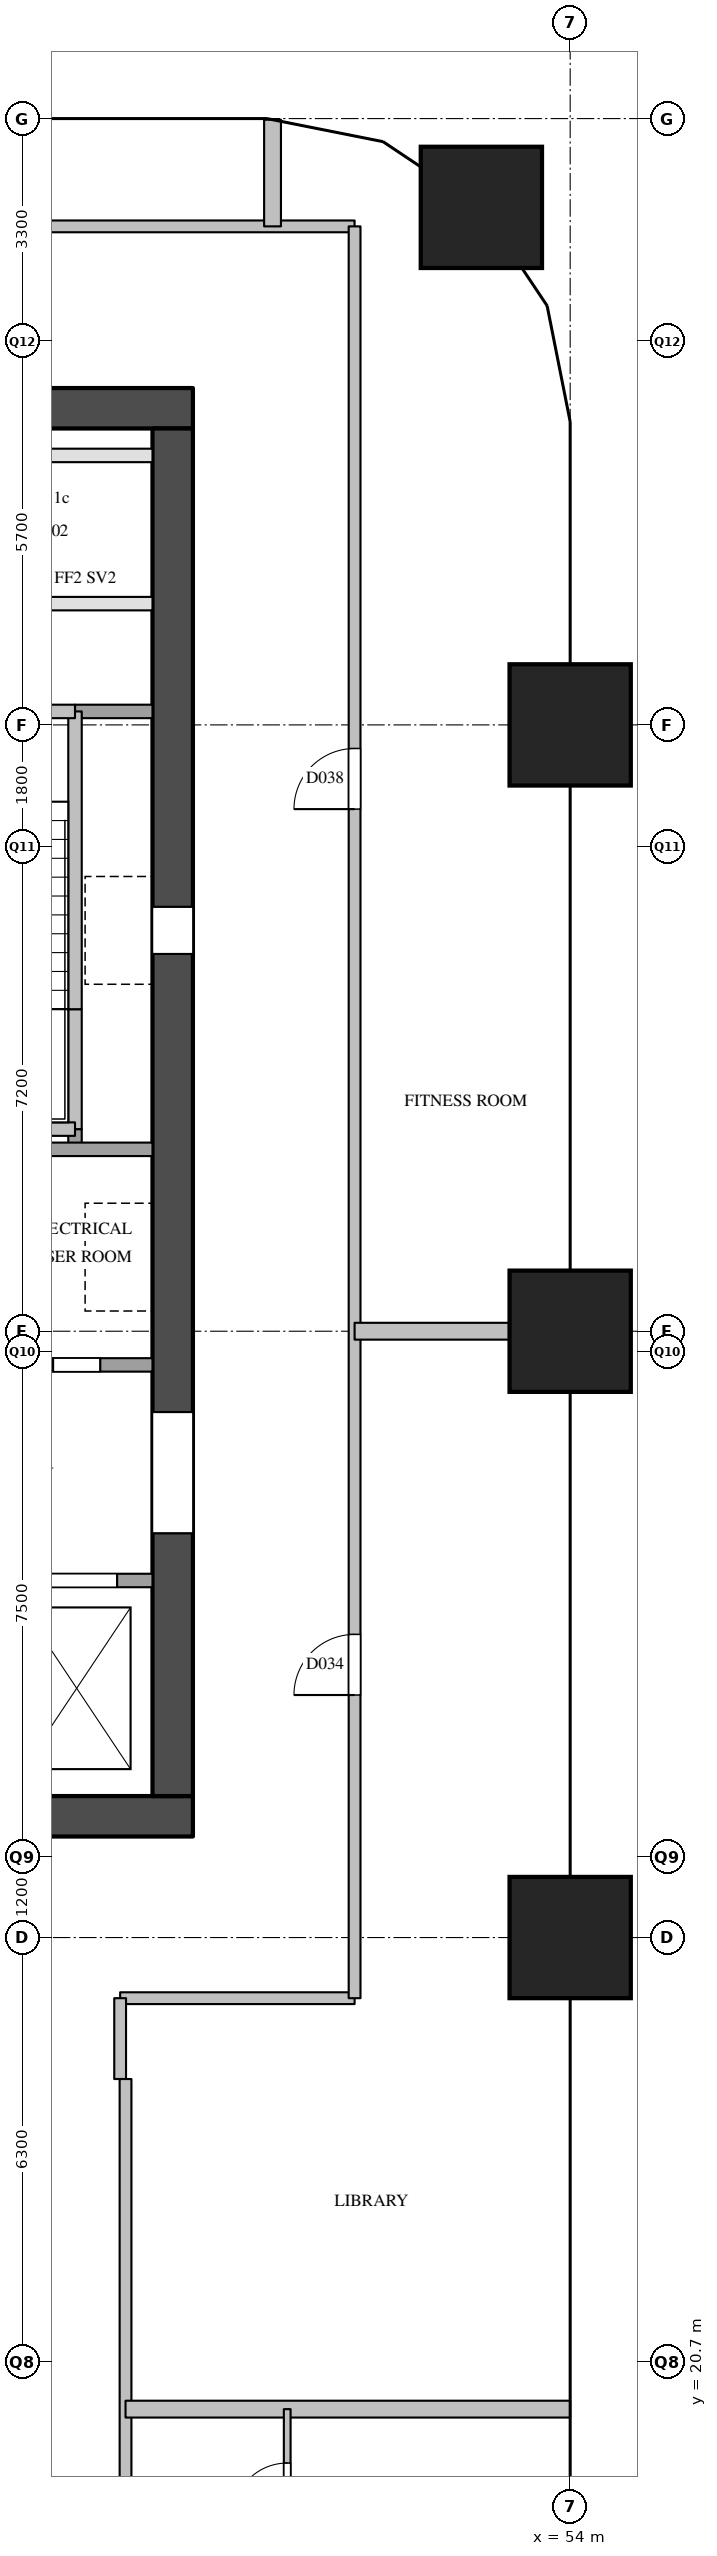
"""IFC4 building model, lengths in metres.
Left out: names, types, materials, properties, quantities, classifications, styles, units other than length and angle.
Written with IfcOpenShell. Run it as: python <this file> out.ifc"""

import sys

from ifc_helpers import new_model, si_unit, direction, frame, frame_2d, origin, origin_2d, place, context, subcontext, project, spatial, rectangle, extrude, element, fill, save


model = new_model("IFC4")
c1 = context("Model", 3, precision=1e-05, world=origin(), true_north=direction((0.0, 1.0)))
c2 = subcontext(c1, "Body", "Model", "MODEL_VIEW")
j1 = project(units=[si_unit("LENGTHUNIT", "METRE"), si_unit("PLANEANGLEUNIT", "RADIAN")], contexts=[c1])
p1 = place(None, origin())
s1 = spatial("IfcSite", under=j1, at=p1, CompositionType="ELEMENT")
p2 = place(p1, origin())
s2 = spatial("IfcBuilding", under=s1, at=p2, CompositionType="ELEMENT")
p3 = place(p2, frame((0.0, 0.0, 38.6)))
s3 = spatial("IfcBuildingStorey", under=s2, at=p3, CompositionType="ELEMENT", Elevation=38.6)
for number, where, z_axis, x_axis in (
    (1, (54.0, 27.0, 0.0), (0.0, 0.0, 1.0), (1.0, 0.0, 0.0)),
    (2, (54.0, 36.0, 0.0), (0.0, 0.0, 1.0), (1.0, 0.0, 0.0)),
    (3, (54.0, 45.0, 0.0), (0.0, 0.0, 1.0), (1.0, 0.0, 0.0)),
    (4, (52.682, 52.682, 0.0), (0.0, 0.0, 1.0), (1.0, 0.0, 0.0)),
):
    element("IfcColumn", number, at=place(p3, frame(where, z_axis=z_axis, x_axis=x_axis)), inside=s3, PredefinedType="COLUMN", context=c2, shape_type="SweptSolid", body=[
        extrude(rectangle(XDim=1.8, YDim=1.8, at=origin_2d()), origin(), (0.0, 0.0, 1.0), 3.8),
    ])
for number, where, z_axis, x_axis in (
    (5, (36.0, 28.8, 0.0), (0.0, 0.0, 1.0), (1.0, 0.0, 0.0)),
    (6, (36.0, 49.7, 0.0), (0.0, 0.0, 1.0), (1.0, 0.0, 0.0)),
):
    element("IfcWall", number, at=place(p3, frame(where, z_axis=z_axis, x_axis=x_axis)), inside=s3, PredefinedType="SHEAR", context=c2, shape_type="SweptSolid", body=[
        extrude(rectangle(XDim=12.4, YDim=0.6, at=frame_2d((6.2, 0.0))), origin(), (0.0, 0.0, 1.0), 3.5),
    ])
p4 = place(p3, frame((48.1, 29.1, 0.0), z_axis=(0.0, 0.0, 1.0), x_axis=(0.0, 1.0, 0.0)))
e7 = element("IfcWall", 7, at=p4, inside=s3, PredefinedType="SHEAR", context=c2, shape_type="SweptSolid", body=[
    extrude(rectangle(XDim=20.3, YDim=0.6, at=frame_2d((10.15, 0.0))), origin(), (0.0, 0.0, 1.0), 3.5),
])
p5 = place(p4, frame((12.5, 0.0, 0.0)))
e8 = element("IfcOpeningElement", 8, at=p5, cuts=e7, PredefinedType="OPENING", context=c2, shape_type="SweptSolid", body=[
    extrude(rectangle(XDim=0.7, YDim=2.1, at=frame_2d((0.35, 1.05))), frame((0.0, 0.31, 0.0), z_axis=(0.0, -1.0, 0.0), x_axis=(1.0, 0.0, 0.0)), (0.0, 0.0, 1.0), 0.62),
])
p6 = place(p4, frame((3.9, 0.0, 0.0)))
e9 = element("IfcOpeningElement", 9, at=p6, cuts=e7, PredefinedType="OPENING", context=c2, shape_type="SweptSolid", body=[
    extrude(rectangle(XDim=1.8, YDim=2.1, at=frame_2d((0.9, 1.05))), frame((0.0, 0.31, 0.0), z_axis=(0.0, -1.0, 0.0), x_axis=(1.0, 0.0, 0.0)), (0.0, 0.0, 1.0), 0.62),
])
p7 = place(p3, frame((46.65, 38.7, 0.0), z_axis=(0.0, 0.0, 1.0), x_axis=(0.0, 1.0, 0.0)))
e10 = element("IfcWall", 10, at=p7, inside=s3, PredefinedType="SOLIDWALL", context=c2, shape_type="SweptSolid", body=[
    extrude(rectangle(XDim=0.3, YDim=0.2, at=frame_2d((0.15, 0.0))), origin(), (0.0, 0.0, 1.0), 3.5),
])
p8 = place(p3, frame((46.65, 39.0, 0.0), z_axis=(0.0, 0.0, 1.0), x_axis=(0.0, 1.0, 0.0)))
e11 = element("IfcWall", 11, at=p8, inside=s3, PredefinedType="SOLIDWALL", context=c2, shape_type="SweptSolid", body=[
    extrude(rectangle(XDim=1.78, YDim=0.2, at=frame_2d((0.89, 0.0))), origin(), (0.0, 0.0, 1.0), 3.5),
])
p9 = place(p3, frame((46.65, 40.78, 0.0), z_axis=(0.0, 0.0, 1.0), x_axis=(0.0, 1.0, 0.0)))
e12 = element("IfcWall", 12, at=p9, inside=s3, PredefinedType="SOLIDWALL", context=c2, shape_type="SweptSolid", body=[
    extrude(rectangle(XDim=4.42, YDim=0.2, at=frame_2d((2.21, 0.0))), origin(), (0.0, 0.0, 1.0), 3.5),
])
p10 = place(p3, frame((36.6, 32.3, 0.0), z_axis=(0.0, 0.0, 1.0), x_axis=(1.0, 0.0, 0.0)))
e13 = element("IfcWall", 13, at=p10, inside=s3, PredefinedType="SOLIDWALL", context=c2, shape_type="SweptSolid", body=[
    extrude(rectangle(XDim=11.2, YDim=0.2, at=frame_2d((5.6, 0.0))), origin(), (0.0, 0.0, 1.0), 3.5),
])
p11 = place(p10, frame((7.225, 0.0, 0.0)))
e14 = element("IfcOpeningElement", 14, at=p11, cuts=e13, PredefinedType="OPENING", context=c2, shape_type="SweptSolid", body=[
    extrude(rectangle(XDim=1.2, YDim=2.1, at=frame_2d((0.6, 1.05))), frame((0.0, 0.11, 0.0), z_axis=(0.0, -1.0, 0.0), x_axis=(1.0, 0.0, 0.0)), (0.0, 0.0, 1.0), 0.22),
])
p12 = place(p10, frame((9.475, 0.0, 0.0)))
e15 = element("IfcOpeningElement", 15, at=p12, cuts=e13, PredefinedType="OPENING", context=c2, shape_type="SweptSolid", body=[
    extrude(rectangle(XDim=1.2, YDim=2.1, at=frame_2d((0.6, 1.05))), frame((0.0, 0.11, 0.0), z_axis=(0.0, -1.0, 0.0), x_axis=(1.0, 0.0, 0.0)), (0.0, 0.0, 1.0), 0.22),
])
p13 = place(p3, frame((43.3, 35.5, 0.0), z_axis=(0.0, 0.0, 1.0), x_axis=(1.0, 0.0, 0.0)))
e16 = element("IfcWall", 16, at=p13, inside=s3, PredefinedType="SOLIDWALL", context=c2, shape_type="SweptSolid", body=[
    extrude(rectangle(XDim=4.5, YDim=0.2, at=frame_2d((2.25, 0.0))), origin(), (0.0, 0.0, 1.0), 3.5),
])
p14 = place(p13, frame((0.525, 0.0, 0.0)))
e17 = element("IfcOpeningElement", 17, at=p14, cuts=e16, PredefinedType="OPENING", context=c2, shape_type="SweptSolid", body=[
    extrude(rectangle(XDim=1.2, YDim=2.1, at=frame_2d((0.6, 1.05))), frame((0.0, 0.11, 0.0), z_axis=(0.0, -1.0, 0.0), x_axis=(1.0, 0.0, 0.0)), (0.0, 0.0, 1.0), 0.22),
])
p15 = place(p13, frame((3.025, 0.0, 0.0)))
e18 = element("IfcOpeningElement", 18, at=p15, cuts=e16, PredefinedType="OPENING", context=c2, shape_type="SweptSolid", body=[
    extrude(rectangle(XDim=0.7, YDim=2.1, at=frame_2d((0.35, 1.05))), frame((0.0, 0.11, 0.0), z_axis=(0.0, -1.0, 0.0), x_axis=(1.0, 0.0, 0.0)), (0.0, 0.0, 1.0), 0.22),
])
p16 = place(p3, frame((43.3, 38.7, 0.0), z_axis=(0.0, 0.0, 1.0), x_axis=(1.0, 0.0, 0.0)))
e19 = element("IfcWall", 19, at=p16, inside=s3, PredefinedType="SOLIDWALL", context=c2, shape_type="SweptSolid", body=[
    extrude(rectangle(XDim=4.5, YDim=0.2, at=frame_2d((2.25, 0.0))), origin(), (0.0, 0.0, 1.0), 3.5),
])
p17 = place(p3, frame((43.4, 39.0, 0.0), z_axis=(0.0, 0.0, 1.0), x_axis=(1.0, 0.0, 0.0)))
e20 = element("IfcWall", 20, at=p17, inside=s3, PredefinedType="SOLIDWALL", context=c2, shape_type="SweptSolid", body=[
    extrude(rectangle(XDim=3.25, YDim=0.2, at=frame_2d((1.625, 0.0))), origin(), (0.0, 0.0, 1.0), 3.5),
])
p18 = place(p3, frame((46.65, 45.2, 0.0), z_axis=(0.0, 0.0, 1.0), x_axis=(1.0, 0.0, 0.0)))
e21 = element("IfcWall", 21, at=p18, inside=s3, PredefinedType="SOLIDWALL", context=c2, shape_type="SweptSolid", body=[
    extrude(rectangle(XDim=1.15, YDim=0.2, at=frame_2d((0.575, 0.0))), origin(), (0.0, 0.0, 1.0), 3.5),
])
p19 = place(p3, frame((36.6, 45.2, 0.0), z_axis=(0.0, 0.0, 1.0), x_axis=(1.0, 0.0, 0.0)))
e22 = element("IfcWall", 22, at=p19, inside=s3, PredefinedType="SOLIDWALL", context=c2, shape_type="SweptSolid", body=[
    extrude(rectangle(XDim=10.05, YDim=0.2, at=frame_2d((5.025, 0.0))), origin(), (0.0, 0.0, 1.0), 3.5),
])
p20 = place(p19, frame((1.125, 0.0, 0.0)))
e23 = element("IfcOpeningElement", 23, at=p20, cuts=e22, PredefinedType="OPENING", context=c2, shape_type="SweptSolid", body=[
    extrude(rectangle(XDim=1.1, YDim=2.1, at=frame_2d((0.55, 1.05))), frame((0.0, 0.11, 0.0), z_axis=(0.0, -1.0, 0.0), x_axis=(1.0, 0.0, 0.0)), (0.0, 0.0, 1.0), 0.22),
])
p21 = place(p19, frame((4.475, 0.0, 0.0)))
e24 = element("IfcOpeningElement", 24, at=p21, cuts=e22, PredefinedType="OPENING", context=c2, shape_type="SweptSolid", body=[
    extrude(rectangle(XDim=1.1, YDim=2.1, at=frame_2d((0.55, 1.05))), frame((0.0, 0.11, 0.0), z_axis=(0.0, -1.0, 0.0), x_axis=(1.0, 0.0, 0.0)), (0.0, 0.0, 1.0), 0.22),
])
p22 = place(p19, frame((7.825, 0.0, 0.0)))
e25 = element("IfcOpeningElement", 25, at=p22, cuts=e22, PredefinedType="OPENING", context=c2, shape_type="SweptSolid", body=[
    extrude(rectangle(XDim=1.1, YDim=2.1, at=frame_2d((0.55, 1.05))), frame((0.0, 0.11, 0.0), z_axis=(0.0, -1.0, 0.0), x_axis=(1.0, 0.0, 0.0)), (0.0, 0.0, 1.0), 0.22),
])
p23 = place(p3, frame((36.6, 46.8, 0.0), z_axis=(0.0, 0.0, 1.0), x_axis=(1.0, 0.0, 0.0)))
e26 = element("IfcWall", 26, at=p23, inside=s3, PredefinedType="PARTITIONING", context=c2, shape_type="SweptSolid", body=[
    extrude(rectangle(XDim=11.2, YDim=0.2, at=frame_2d((5.6, 0.0))), origin(), (0.0, 0.0, 1.0), 3.5),
])
p24 = place(p23, frame((1.23, 0.0, 0.0)))
e27 = element("IfcOpeningElement", 27, at=p24, cuts=e26, PredefinedType="OPENING", context=c2, shape_type="SweptSolid", body=[
    extrude(rectangle(XDim=0.9, YDim=2.1, at=frame_2d((0.45, 1.05))), frame((0.0, 0.11, 0.0), z_axis=(0.0, -1.0, 0.0), x_axis=(1.0, 0.0, 0.0)), (0.0, 0.0, 1.0), 0.22),
])
p25 = place(p23, frame((6.83, 0.0, 0.0)))
e28 = element("IfcOpeningElement", 28, at=p25, cuts=e26, PredefinedType="OPENING", context=c2, shape_type="SweptSolid", body=[
    extrude(rectangle(XDim=0.9, YDim=2.1, at=frame_2d((0.45, 1.05))), frame((0.0, 0.11, 0.0), z_axis=(0.0, -1.0, 0.0), x_axis=(1.0, 0.0, 0.0)), (0.0, 0.0, 1.0), 0.22),
])
p26 = place(p3, frame((36.6, 49.0, 0.0), z_axis=(0.0, 0.0, 1.0), x_axis=(1.0, 0.0, 0.0)))
e29 = element("IfcWall", 29, at=p26, inside=s3, PredefinedType="PARTITIONING", context=c2, shape_type="SweptSolid", body=[
    extrude(rectangle(XDim=11.2, YDim=0.2, at=frame_2d((5.6, 0.0))), origin(), (0.0, 0.0, 1.0), 3.5),
])
p27 = place(p3, frame((47.32, 24.9, 0.0), z_axis=(0.0, 0.0, 1.0), x_axis=(1.0, 0.0, 0.0)))
e30 = element("IfcWall", 30, at=p27, inside=s3, PredefinedType="PARTITIONING", context=c2, shape_type="SweptSolid", body=[
    extrude(rectangle(XDim=0.08, YDim=0.175, at=frame_2d((0.04, 0.0))), origin(), (0.0, 0.0, 1.0), 3.5),
])
p28 = place(p3, frame((47.32, 26.1, 0.0), z_axis=(0.0, 0.0, 1.0), x_axis=(1.0, 0.0, 0.0)))
e31 = element("IfcWall", 31, at=p28, inside=s3, PredefinedType="PARTITIONING", context=c2, shape_type="SweptSolid", body=[
    extrude(rectangle(XDim=3.48, YDim=0.175, at=frame_2d((1.74, 0.0))), origin(), (0.0, 0.0, 1.0), 3.5),
])
p29 = place(p3, frame((33.6, 52.4, 0.0), z_axis=(0.0, 0.0, 1.0), x_axis=(1.0, 0.0, 0.0)))
e32 = element("IfcWall", 32, at=p29, inside=s3, PredefinedType="PARTITIONING", context=c2, shape_type="SweptSolid", body=[
    extrude(rectangle(XDim=17.2, YDim=0.175, at=frame_2d((8.6, 0.0))), origin(), (0.0, 0.0, 1.0), 3.5),
])
p30 = place(p29, frame((8.691, 0.0, 0.0)))
e33 = element("IfcOpeningElement", 33, at=p30, cuts=e32, PredefinedType="OPENING", context=c2, shape_type="SweptSolid", body=[
    extrude(rectangle(XDim=1.0, YDim=2.1, at=frame_2d((0.5, 1.05))), frame((0.0, 0.097, 0.0), z_axis=(0.0, -1.0, 0.0), x_axis=(1.0, 0.0, 0.0)), (0.0, 0.0, 1.0), 0.195),
])
p31 = place(p3, frame((47.32, 24.9, 0.0), z_axis=(0.0, 0.0, 1.0), x_axis=(0.0, 1.0, 0.0)))
e34 = element("IfcWall", 34, at=p31, inside=s3, PredefinedType="PARTITIONING", context=c2, shape_type="SweptSolid", body=[
    extrude(rectangle(XDim=1.2, YDim=0.175, at=frame_2d((0.6, 0.0))), origin(), (0.0, 0.0, 1.0), 3.5),
])
p32 = place(p3, frame((47.4, 6.6, 0.0), z_axis=(0.0, 0.0, 1.0), x_axis=(0.0, 1.0, 0.0)))
e35 = element("IfcWall", 35, at=p32, inside=s3, PredefinedType="PARTITIONING", context=c2, shape_type="SweptSolid", body=[
    extrude(rectangle(XDim=18.3, YDim=0.175, at=frame_2d((9.15, 0.0))), origin(), (0.0, 0.0, 1.0), 3.5),
])
p33 = place(p32, frame((1.7, 0.0, 0.0)))
e36 = element("IfcOpeningElement", 36, at=p33, cuts=e35, PredefinedType="OPENING", context=c2, shape_type="SweptSolid", body=[
    extrude(rectangle(XDim=1.0, YDim=2.1, at=frame_2d((0.5, 1.05))), frame((0.0, 0.097, 0.0), z_axis=(0.0, -1.0, 0.0), x_axis=(1.0, 0.0, 0.0)), (0.0, 0.0, 1.0), 0.195),
])
p34 = place(p32, frame((7.7, 0.0, 0.0)))
e37 = element("IfcOpeningElement", 37, at=p34, cuts=e35, PredefinedType="OPENING", context=c2, shape_type="SweptSolid", body=[
    extrude(rectangle(XDim=1.0, YDim=2.1, at=frame_2d((0.5, 1.05))), frame((0.0, 0.097, 0.0), z_axis=(0.0, -1.0, 0.0), x_axis=(1.0, 0.0, 0.0)), (0.0, 0.0, 1.0), 0.195),
])
p35 = place(p3, frame((50.8, 26.1, 0.0), z_axis=(0.0, 0.0, 1.0), x_axis=(0.0, 1.0, 0.0)))
e38 = element("IfcWall", 38, at=p35, inside=s3, PredefinedType="PARTITIONING", context=c2, shape_type="SweptSolid", body=[
    extrude(rectangle(XDim=26.3, YDim=0.175, at=frame_2d((13.15, 0.0))), origin(), (0.0, 0.0, 1.0), 2.5),
])
p36 = place(p35, frame((4.5, 0.0, 0.0)))
e39 = element("IfcOpeningElement", 39, at=p36, cuts=e38, PredefinedType="OPENING", context=c2, shape_type="SweptSolid", body=[
    extrude(rectangle(XDim=0.9, YDim=2.1, at=frame_2d((0.45, 1.05))), frame((0.0, 0.097, 0.0), z_axis=(0.0, -1.0, 0.0), x_axis=(1.0, 0.0, 0.0)), (0.0, 0.0, 1.0), 0.195),
])
p37 = place(p35, frame((17.65, 0.0, 0.0)))
e40 = element("IfcOpeningElement", 40, at=p37, cuts=e38, PredefinedType="OPENING", context=c2, shape_type="SweptSolid", body=[
    extrude(rectangle(XDim=0.9, YDim=2.1, at=frame_2d((0.45, 1.05))), frame((0.0, 0.097, 0.0), z_axis=(0.0, -1.0, 0.0), x_axis=(1.0, 0.0, 0.0)), (0.0, 0.0, 1.0), 0.195),
])
p38 = place(p3, frame((47.4, 20.0, 0.0), z_axis=(0.0, 0.0, 1.0), x_axis=(1.0, 0.0, 0.0)))
e41 = element("IfcWall", 41, at=p38, inside=s3, PredefinedType="PARTITIONING", context=c2, shape_type="SweptSolid", body=[
    extrude(rectangle(XDim=6.6, YDim=0.25, at=frame_2d((3.3, 0.0))), origin(), (0.0, 0.0, 1.0), 2.5),
])
p39 = place(p3, frame((50.8, 36.0, 0.0), z_axis=(0.0, 0.0, 1.0), x_axis=(1.0, 0.0, 0.0)))
e42 = element("IfcWall", 42, at=p39, inside=s3, PredefinedType="PARTITIONING", context=c2, shape_type="SweptSolid", body=[
    extrude(rectangle(XDim=3.2, YDim=0.25, at=frame_2d((1.6, 0.0))), origin(), (0.0, 0.0, 1.0), 3.5),
])
p40 = place(p3, frame((49.582, 52.4, 0.0), z_axis=(0.0, 0.0, 1.0), x_axis=(0.0, 1.0, 0.0)))
e43 = element("IfcWall", 43, at=p40, inside=s3, PredefinedType="PARTITIONING", context=c2, shape_type="SweptSolid", body=[
    extrude(rectangle(XDim=1.584, YDim=0.25, at=frame_2d((0.792, 0.0))), origin(), (0.0, 0.0, 1.0), 2.5),
])
p41 = place(p3, frame((49.8, 17.6, 0.0), z_axis=(0.0, 0.0, 1.0), x_axis=(0.0, 1.0, 0.0)))
e44 = element("IfcWall", 44, at=p41, inside=s3, PredefinedType="PARTITIONING", context=c2, shape_type="SweptSolid", body=[
    extrude(rectangle(XDim=2.4, YDim=0.1, at=frame_2d((1.2, 0.0))), origin(), (0.0, 0.0, 1.0), 3.5),
])
p42 = place(p41, frame((0.8, 0.0, 0.0)))
e45 = element("IfcOpeningElement", 45, at=p42, cuts=e44, PredefinedType="OPENING", context=c2, shape_type="SweptSolid", body=[
    extrude(rectangle(XDim=0.8, YDim=2.1, at=frame_2d((0.4, 1.05))), frame((0.0, 0.06, 0.0), z_axis=(0.0, -1.0, 0.0), x_axis=(1.0, 0.0, 0.0)), (0.0, 0.0, 1.0), 0.12),
])
p43 = place(p12, origin())
e46 = element("IfcDoor", 46, at=p43, inside=s3, OperationType="SLIDING_TO_LEFT", PredefinedType="DOOR", context=c2, shape_type="SweptSolid", body=[
    extrude(rectangle(XDim=1.2, YDim=2.1, at=frame_2d((0.6, 1.05))), frame((0.0, 0.025, 0.0), z_axis=(0.0, -1.0, 0.0), x_axis=(1.0, 0.0, 0.0)), (0.0, 0.0, 1.0), 0.05),
])
fill(e15, e46)
p44 = place(p5, origin())
e47 = element("IfcDoor", 47, at=p44, inside=s3, OperationType="SINGLE_SWING_RIGHT", PredefinedType="DOOR", context=c2, shape_type="SweptSolid", body=[
    extrude(rectangle(XDim=0.7, YDim=2.1, at=frame_2d((0.35, 1.05))), frame((0.0, 0.025, 0.0), z_axis=(0.0, -1.0, 0.0), x_axis=(1.0, 0.0, 0.0)), (0.0, 0.0, 1.0), 0.05),
])
fill(e8, e47)
p45 = place(p6, origin())
e48 = element("IfcDoor", 48, at=p45, inside=s3, OperationType="DOUBLE_DOOR_SINGLE_SWING", PredefinedType="DOOR", context=c2, shape_type="SweptSolid", body=[
    extrude(rectangle(XDim=1.8, YDim=2.1, at=frame_2d((0.9, 1.05))), frame((0.0, 0.025, 0.0), z_axis=(0.0, -1.0, 0.0), x_axis=(1.0, 0.0, 0.0)), (0.0, 0.0, 1.0), 0.05),
])
fill(e9, e48)
p46 = place(p15, origin())
e49 = element("IfcDoor", 49, at=p46, inside=s3, OperationType="SINGLE_SWING_RIGHT", PredefinedType="DOOR", context=c2, shape_type="SweptSolid", body=[
    extrude(rectangle(XDim=0.7, YDim=2.1, at=frame_2d((0.35, 1.05))), frame((0.0, 0.025, 0.0), z_axis=(0.0, -1.0, 0.0), x_axis=(1.0, 0.0, 0.0)), (0.0, 0.0, 1.0), 0.05),
])
fill(e18, e49)
p47 = place(p42, origin())
e50 = element("IfcDoor", 50, at=p47, inside=s3, OperationType="SINGLE_SWING_LEFT", PredefinedType="DOOR", context=c2, shape_type="SweptSolid", body=[
    extrude(rectangle(XDim=0.8, YDim=2.1, at=frame_2d((0.4, 1.05))), frame((0.0, 0.025, 0.0), z_axis=(0.0, -1.0, 0.0), x_axis=(1.0, 0.0, 0.0)), (0.0, 0.0, 1.0), 0.05),
])
fill(e45, e50)
p48 = place(p36, origin())
e51 = element("IfcDoor", 51, at=p48, inside=s3, OperationType="SINGLE_SWING_LEFT", PredefinedType="DOOR", context=c2, shape_type="SweptSolid", body=[
    extrude(rectangle(XDim=0.9, YDim=2.1, at=frame_2d((0.45, 1.05))), frame((0.0, 0.025, 0.0), z_axis=(0.0, -1.0, 0.0), x_axis=(1.0, 0.0, 0.0)), (0.0, 0.0, 1.0), 0.05),
])
fill(e39, e51)
p49 = place(p37, origin())
e52 = element("IfcDoor", 52, at=p49, inside=s3, OperationType="SINGLE_SWING_LEFT", PredefinedType="DOOR", context=c2, shape_type="SweptSolid", body=[
    extrude(rectangle(XDim=0.9, YDim=2.1, at=frame_2d((0.45, 1.05))), frame((0.0, 0.025, 0.0), z_axis=(0.0, -1.0, 0.0), x_axis=(1.0, 0.0, 0.0)), (0.0, 0.0, 1.0), 0.05),
])
fill(e40, e52)
save(model, sys.argv[1])
